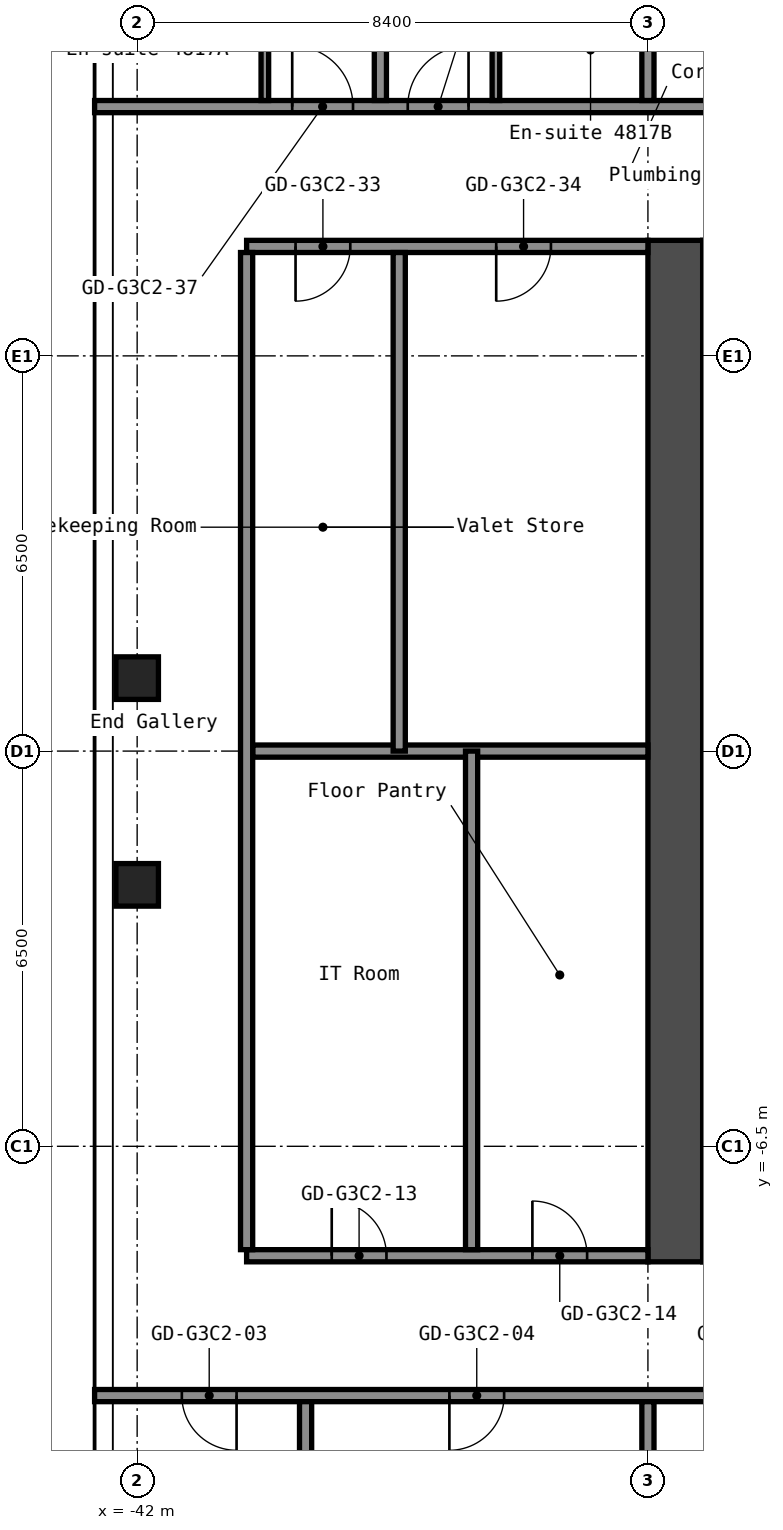
"""IFC4 building model, lengths in metres.
Left out: names, types, materials, properties, quantities, classifications, styles, units other than length and angle.
Written with IfcOpenShell. Run it as: python <this file> out.ifc"""

import sys

from ifc_helpers import new_model, si_unit, direction, frame, frame_2d, origin, origin_2d, place, context, subcontext, project, spatial, rectangle, hollow_rectangle, extrude, element, fill, save


model = new_model("IFC4")
c1 = context("Model", 3, precision=1e-05, world=origin(), true_north=direction((0.0, 1.0)))
c2 = subcontext(c1, "Body", "Model", "MODEL_VIEW")
j1 = project(units=[si_unit("LENGTHUNIT", "METRE"), si_unit("PLANEANGLEUNIT", "RADIAN")], contexts=[c1])
p1 = place(None, origin())
s1 = spatial("IfcSite", under=j1, at=p1, CompositionType="ELEMENT")
p2 = place(p1, origin())
s2 = spatial("IfcBuilding", under=s1, at=p2, CompositionType="ELEMENT")
p3 = place(p2, frame((0.0, 0.0, 169.4)))
s3 = spatial("IfcBuildingStorey", under=s2, at=p3, CompositionType="ELEMENT", Elevation=169.4)
for number, where, z_axis, x_axis in (
    (1, (-42.0, -2.2, 0.0), (0.0, 0.0, 1.0), (1.0, 0.0, 0.0)),
    (2, (-42.0, 1.2, 0.0), (0.0, 0.0, 1.0), (1.0, 0.0, 0.0)),
):
    element("IfcColumn", number, at=place(p3, frame(where, z_axis=z_axis, x_axis=x_axis)), inside=s3, PredefinedType="COLUMN", context=c2, shape_type="SweptSolid", body=[
        extrude(hollow_rectangle(XDim=0.7, YDim=0.7, WallThickness=0.028, at=origin_2d()), origin(), (0.0, 0.0, 1.0), 2.75),
    ])
p4 = place(p3, frame((-33.15, -8.4, 0.0), z_axis=(0.0, 0.0, 1.0), x_axis=(0.0, 1.0, 0.0)))
e3 = element("IfcWall", 3, at=p4, inside=s3, PredefinedType="SHEAR", context=c2, shape_type="SweptSolid", body=[
    extrude(rectangle(XDim=16.8, YDim=0.9, at=frame_2d((8.4, 0.0))), origin(), (0.0, 0.0, 1.0), 2.75),
])
p5 = place(p3, frame((-42.7, -10.6, 0.0), z_axis=(0.0, 0.0, 1.0), x_axis=(1.0, 0.0, 0.0)))
e4 = element("IfcWall", 4, at=p5, inside=s3, PredefinedType="PARTITIONING", context=c2, shape_type="SweptSolid", body=[
    extrude(rectangle(XDim=25.9, YDim=0.2, at=frame_2d((12.95, 0.0))), origin(), (0.0, 0.0, 1.0), 2.75),
])
p6 = place(p5, frame((1.435, 0.0, 0.0)))
e5 = element("IfcOpeningElement", 5, at=p6, cuts=e4, PredefinedType="OPENING", context=c2, shape_type="SweptSolid", body=[
    extrude(rectangle(XDim=0.9, YDim=2.1, at=frame_2d((0.45, 1.05))), frame((0.0, 0.11, 0.0), z_axis=(0.0, -1.0, 0.0), x_axis=(1.0, 0.0, 0.0)), (0.0, 0.0, 1.0), 0.22),
])
p7 = place(p5, frame((5.835, 0.0, 0.0)))
e6 = element("IfcOpeningElement", 6, at=p7, cuts=e4, PredefinedType="OPENING", context=c2, shape_type="SweptSolid", body=[
    extrude(rectangle(XDim=0.9, YDim=2.1, at=frame_2d((0.45, 1.05))), frame((0.0, 0.11, 0.0), z_axis=(0.0, -1.0, 0.0), x_axis=(1.0, 0.0, 0.0)), (0.0, 0.0, 1.0), 0.22),
])
p8 = place(p5, frame((10.415, 0.0, 0.0)))
e7 = element("IfcOpeningElement", 7, at=p8, cuts=e4, PredefinedType="OPENING", context=c2, shape_type="SweptSolid", body=[
    extrude(rectangle(XDim=0.9, YDim=2.1, at=frame_2d((0.45, 1.05))), frame((0.0, 0.11, 0.0), z_axis=(0.0, -1.0, 0.0), x_axis=(1.0, 0.0, 0.0)), (0.0, 0.0, 1.0), 0.22),
])
p9 = place(p5, frame((14.615, 0.0, 0.0)))
e8 = element("IfcOpeningElement", 8, at=p9, cuts=e4, PredefinedType="OPENING", context=c2, shape_type="SweptSolid", body=[
    extrude(rectangle(XDim=0.9, YDim=2.1, at=frame_2d((0.45, 1.05))), frame((0.0, 0.11, 0.0), z_axis=(0.0, -1.0, 0.0), x_axis=(1.0, 0.0, 0.0)), (0.0, 0.0, 1.0), 0.22),
])
p10 = place(p5, frame((19.32, 0.0, 0.0)))
e9 = element("IfcOpeningElement", 9, at=p10, cuts=e4, PredefinedType="OPENING", context=c2, shape_type="SweptSolid", body=[
    extrude(rectangle(XDim=0.9, YDim=2.1, at=frame_2d((0.45, 1.05))), frame((0.0, 0.11, 0.0), z_axis=(0.0, -1.0, 0.0), x_axis=(1.0, 0.0, 0.0)), (0.0, 0.0, 1.0), 0.22),
])
p11 = place(p5, frame((23.52, 0.0, 0.0)))
e10 = element("IfcOpeningElement", 10, at=p11, cuts=e4, PredefinedType="OPENING", context=c2, shape_type="SweptSolid", body=[
    extrude(rectangle(XDim=0.9, YDim=2.1, at=frame_2d((0.45, 1.05))), frame((0.0, 0.11, 0.0), z_axis=(0.0, -1.0, 0.0), x_axis=(1.0, 0.0, 0.0)), (0.0, 0.0, 1.0), 0.22),
])
p12 = place(p3, frame((-40.2, -8.3, 0.0), z_axis=(0.0, 0.0, 1.0), x_axis=(1.0, 0.0, 0.0)))
e11 = element("IfcWall", 11, at=p12, inside=s3, PredefinedType="PARTITIONING", context=c2, shape_type="SweptSolid", body=[
    extrude(rectangle(XDim=6.6, YDim=0.2, at=frame_2d((3.3, 0.0))), origin(), (0.0, 0.0, 1.0), 2.75),
])
p13 = place(p12, frame((1.4, 0.0, 0.0)))
e12 = element("IfcOpeningElement", 12, at=p13, cuts=e11, PredefinedType="OPENING", context=c2, shape_type="SweptSolid", body=[
    extrude(rectangle(XDim=0.9, YDim=2.1, at=frame_2d((0.45, 1.05))), frame((0.0, 0.11, 0.0), z_axis=(0.0, -1.0, 0.0), x_axis=(1.0, 0.0, 0.0)), (0.0, 0.0, 1.0), 0.22),
])
p14 = place(p12, frame((4.7, 0.0, 0.0)))
e13 = element("IfcOpeningElement", 13, at=p14, cuts=e11, PredefinedType="OPENING", context=c2, shape_type="SweptSolid", body=[
    extrude(rectangle(XDim=0.9, YDim=2.1, at=frame_2d((0.45, 1.05))), frame((0.0, 0.11, 0.0), z_axis=(0.0, -1.0, 0.0), x_axis=(1.0, 0.0, 0.0)), (0.0, 0.0, 1.0), 0.22),
])
p15 = place(p3, frame((-40.1, 0.0, 0.0), z_axis=(0.0, 0.0, 1.0), x_axis=(1.0, 0.0, 0.0)))
e14 = element("IfcWall", 14, at=p15, inside=s3, PredefinedType="PARTITIONING", context=c2, shape_type="SweptSolid", body=[
    extrude(rectangle(XDim=6.5, YDim=0.2, at=frame_2d((3.25, 0.0))), origin(), (0.0, 0.0, 1.0), 2.75),
])
p16 = place(p3, frame((-40.2, 8.3, 0.0), z_axis=(0.0, 0.0, 1.0), x_axis=(1.0, 0.0, 0.0)))
e15 = element("IfcWall", 15, at=p16, inside=s3, PredefinedType="PARTITIONING", context=c2, shape_type="SweptSolid", body=[
    extrude(rectangle(XDim=6.6, YDim=0.2, at=frame_2d((3.3, 0.0))), origin(), (0.0, 0.0, 1.0), 2.75),
])
p17 = place(p16, frame((0.805, 0.0, 0.0)))
e16 = element("IfcOpeningElement", 16, at=p17, cuts=e15, PredefinedType="OPENING", context=c2, shape_type="SweptSolid", body=[
    extrude(rectangle(XDim=0.9, YDim=2.1, at=frame_2d((0.45, 1.05))), frame((0.0, 0.11, 0.0), z_axis=(0.0, -1.0, 0.0), x_axis=(1.0, 0.0, 0.0)), (0.0, 0.0, 1.0), 0.22),
])
p18 = place(p16, frame((4.105, 0.0, 0.0)))
e17 = element("IfcOpeningElement", 17, at=p18, cuts=e15, PredefinedType="OPENING", context=c2, shape_type="SweptSolid", body=[
    extrude(rectangle(XDim=0.9, YDim=2.1, at=frame_2d((0.45, 1.05))), frame((0.0, 0.11, 0.0), z_axis=(0.0, -1.0, 0.0), x_axis=(1.0, 0.0, 0.0)), (0.0, 0.0, 1.0), 0.22),
])
p19 = place(p3, frame((-42.7, 10.6, 0.0), z_axis=(0.0, 0.0, 1.0), x_axis=(1.0, 0.0, 0.0)))
e18 = element("IfcWall", 18, at=p19, inside=s3, PredefinedType="PARTITIONING", context=c2, shape_type="SweptSolid", body=[
    extrude(rectangle(XDim=25.9, YDim=0.2, at=frame_2d((12.95, 0.0))), origin(), (0.0, 0.0, 1.0), 2.75),
])
p20 = place(p19, frame((3.25, 0.0, 0.0)))
e19 = element("IfcOpeningElement", 19, at=p20, cuts=e18, PredefinedType="OPENING", context=c2, shape_type="SweptSolid", body=[
    extrude(rectangle(XDim=1.0, YDim=2.1, at=frame_2d((0.5, 1.05))), frame((0.0, 0.11, 0.0), z_axis=(0.0, -1.0, 0.0), x_axis=(1.0, 0.0, 0.0)), (0.0, 0.0, 1.0), 0.22),
])
p21 = place(p19, frame((5.15, 0.0, 0.0)))
e20 = element("IfcOpeningElement", 20, at=p21, cuts=e18, PredefinedType="OPENING", context=c2, shape_type="SweptSolid", body=[
    extrude(rectangle(XDim=1.0, YDim=2.1, at=frame_2d((0.5, 1.05))), frame((0.0, 0.11, 0.0), z_axis=(0.0, -1.0, 0.0), x_axis=(1.0, 0.0, 0.0)), (0.0, 0.0, 1.0), 0.22),
])
p22 = place(p19, frame((14.5, 0.0, 0.0)))
e21 = element("IfcOpeningElement", 21, at=p22, cuts=e18, PredefinedType="OPENING", context=c2, shape_type="SweptSolid", body=[
    extrude(rectangle(XDim=1.0, YDim=2.1, at=frame_2d((0.5, 1.05))), frame((0.0, 0.11, 0.0), z_axis=(0.0, -1.0, 0.0), x_axis=(1.0, 0.0, 0.0)), (0.0, 0.0, 1.0), 0.22),
])
p23 = place(p19, frame((20.35, 0.0, 0.0)))
e22 = element("IfcOpeningElement", 22, at=p23, cuts=e18, PredefinedType="OPENING", context=c2, shape_type="SweptSolid", body=[
    extrude(rectangle(XDim=1.0, YDim=2.1, at=frame_2d((0.5, 1.05))), frame((0.0, 0.11, 0.0), z_axis=(0.0, -1.0, 0.0), x_axis=(1.0, 0.0, 0.0)), (0.0, 0.0, 1.0), 0.22),
])
p24 = place(p19, frame((22.05, 0.0, 0.0)))
e23 = element("IfcOpeningElement", 23, at=p24, cuts=e18, PredefinedType="OPENING", context=c2, shape_type="SweptSolid", body=[
    extrude(rectangle(XDim=1.0, YDim=2.1, at=frame_2d((0.5, 1.05))), frame((0.0, 0.11, 0.0), z_axis=(0.0, -1.0, 0.0), x_axis=(1.0, 0.0, 0.0)), (0.0, 0.0, 1.0), 0.22),
])
p25 = place(p3, frame((-40.2, -8.2, 0.0), z_axis=(0.0, 0.0, 1.0), x_axis=(0.0, 1.0, 0.0)))
e24 = element("IfcWall", 24, at=p25, inside=s3, PredefinedType="PARTITIONING", context=c2, shape_type="SweptSolid", body=[
    extrude(rectangle(XDim=16.4, YDim=0.2, at=frame_2d((8.2, 0.0))), origin(), (0.0, 0.0, 1.0), 2.75),
])
p26 = place(p3, frame((-39.9, 10.7, 0.0), z_axis=(0.0, 0.0, 1.0), x_axis=(0.0, 1.0, 0.0)))
e25 = element("IfcWall", 25, at=p26, inside=s3, PredefinedType="PARTITIONING", context=c2, shape_type="SweptSolid", body=[
    extrude(rectangle(XDim=2.9, YDim=0.125, at=frame_2d((1.45, 0.0))), origin(), (0.0, 0.0, 1.0), 2.75),
])
p27 = place(p26, frame((1.5, 0.0, 0.0)))
e26 = element("IfcOpeningElement", 26, at=p27, cuts=e25, PredefinedType="OPENING", context=c2, shape_type="SweptSolid", body=[
    extrude(rectangle(XDim=0.8, YDim=2.1, at=frame_2d((0.4, 1.05))), frame((0.0, 0.073, 0.0), z_axis=(0.0, -1.0, 0.0), x_axis=(1.0, 0.0, 0.0)), (0.0, 0.0, 1.0), 0.145),
])
p28 = place(p3, frame((-39.23, -19.3, 0.0), z_axis=(0.0, 0.0, 1.0), x_axis=(0.0, 1.0, 0.0)))
e27 = element("IfcWall", 27, at=p28, inside=s3, PredefinedType="PARTITIONING", context=c2, shape_type="SweptSolid", body=[
    extrude(rectangle(XDim=8.6, YDim=0.2, at=frame_2d((4.3, 0.0))), origin(), (0.0, 0.0, 1.0), 2.75),
])
p29 = place(p3, frame((-38.0, 10.7, 0.0), z_axis=(0.0, 0.0, 1.0), x_axis=(0.0, 1.0, 0.0)))
e28 = element("IfcWall", 28, at=p29, inside=s3, PredefinedType="PARTITIONING", context=c2, shape_type="SweptSolid", body=[
    extrude(rectangle(XDim=7.6, YDim=0.2, at=frame_2d((3.8, 0.0))), origin(), (0.0, 0.0, 1.0), 2.75),
])
for number, where, z_axis, x_axis in (
    (29, (-37.69, 0.0, 0.0), (0.0, 0.0, 1.0), (0.0, 1.0, 0.0)),
    (30, (-36.5, -8.2, 0.0), (0.0, 0.0, 1.0), (0.0, 1.0, 0.0)),
):
    element("IfcWall", number, at=place(p3, frame(where, z_axis=z_axis, x_axis=x_axis)), inside=s3, PredefinedType="PARTITIONING", context=c2, shape_type="SweptSolid", body=[
        extrude(rectangle(XDim=8.2, YDim=0.2, at=frame_2d((4.1, 0.0))), origin(), (0.0, 0.0, 1.0), 2.75),
    ])
p30 = place(p3, frame((-36.1, 10.7, 0.0), z_axis=(0.0, 0.0, 1.0), x_axis=(0.0, 1.0, 0.0)))
e31 = element("IfcWall", 31, at=p30, inside=s3, PredefinedType="PARTITIONING", context=c2, shape_type="SweptSolid", body=[
    extrude(rectangle(XDim=2.9, YDim=0.125, at=frame_2d((1.45, 0.0))), origin(), (0.0, 0.0, 1.0), 2.75),
])
p31 = place(p30, frame((1.5, 0.0, 0.0)))
e32 = element("IfcOpeningElement", 32, at=p31, cuts=e31, PredefinedType="OPENING", context=c2, shape_type="SweptSolid", body=[
    extrude(rectangle(XDim=0.8, YDim=2.1, at=frame_2d((0.4, 1.05))), frame((0.0, 0.073, 0.0), z_axis=(0.0, -1.0, 0.0), x_axis=(1.0, 0.0, 0.0)), (0.0, 0.0, 1.0), 0.145),
])
p32 = place(p3, frame((-33.6, -19.3, 0.0), z_axis=(0.0, 0.0, 1.0), x_axis=(0.0, 1.0, 0.0)))
e33 = element("IfcWall", 33, at=p32, inside=s3, PredefinedType="PARTITIONING", context=c2, shape_type="SweptSolid", body=[
    extrude(rectangle(XDim=8.6, YDim=0.2, at=frame_2d((4.3, 0.0))), origin(), (0.0, 0.0, 1.0), 2.75),
])
p33 = place(p3, frame((-33.6, 10.7, 0.0), z_axis=(0.0, 0.0, 1.0), x_axis=(0.0, 1.0, 0.0)))
e34 = element("IfcWall", 34, at=p33, inside=s3, PredefinedType="PARTITIONING", context=c2, shape_type="SweptSolid", body=[
    extrude(rectangle(XDim=7.6, YDim=0.2, at=frame_2d((3.8, 0.0))), origin(), (0.0, 0.0, 1.0), 2.75),
])
p34 = place(p6, origin())
e35 = element("IfcDoor", 35, at=p34, inside=s3, OperationType="SINGLE_SWING_RIGHT", PredefinedType="DOOR", context=c2, shape_type="SweptSolid", body=[
    extrude(rectangle(XDim=0.9, YDim=2.1, at=frame_2d((0.45, 1.05))), frame((0.0, 0.025, 0.0), z_axis=(0.0, -1.0, 0.0), x_axis=(1.0, 0.0, 0.0)), (0.0, 0.0, 1.0), 0.05),
])
fill(e5, e35)
p35 = place(p7, origin())
e36 = element("IfcDoor", 36, at=p35, inside=s3, OperationType="SINGLE_SWING_LEFT", PredefinedType="DOOR", context=c2, shape_type="SweptSolid", body=[
    extrude(rectangle(XDim=0.9, YDim=2.1, at=frame_2d((0.45, 1.05))), frame((0.0, 0.025, 0.0), z_axis=(0.0, -1.0, 0.0), x_axis=(1.0, 0.0, 0.0)), (0.0, 0.0, 1.0), 0.05),
])
fill(e6, e36)
p36 = place(p13, origin())
e37 = element("IfcDoor", 37, at=p36, inside=s3, OperationType="SINGLE_SWING_RIGHT", PredefinedType="DOOR", context=c2, shape_type="SweptSolid", body=[
    extrude(rectangle(XDim=0.9, YDim=2.1, at=frame_2d((0.45, 1.05))), frame((0.0, 0.025, 0.0), z_axis=(0.0, -1.0, 0.0), x_axis=(1.0, 0.0, 0.0)), (0.0, 0.0, 1.0), 0.05),
])
fill(e12, e37)
p37 = place(p14, origin())
e38 = element("IfcDoor", 38, at=p37, inside=s3, OperationType="SINGLE_SWING_RIGHT", PredefinedType="DOOR", context=c2, shape_type="SweptSolid", body=[
    extrude(rectangle(XDim=0.9, YDim=2.1, at=frame_2d((0.45, 1.05))), frame((0.0, 0.025, 0.0), z_axis=(0.0, -1.0, 0.0), x_axis=(1.0, 0.0, 0.0)), (0.0, 0.0, 1.0), 0.05),
])
fill(e13, e38)
p38 = place(p17, origin())
e39 = element("IfcDoor", 39, at=p38, inside=s3, OperationType="SINGLE_SWING_LEFT", PredefinedType="DOOR", context=c2, shape_type="SweptSolid", body=[
    extrude(rectangle(XDim=0.9, YDim=2.1, at=frame_2d((0.45, 1.05))), frame((0.0, 0.025, 0.0), z_axis=(0.0, -1.0, 0.0), x_axis=(1.0, 0.0, 0.0)), (0.0, 0.0, 1.0), 0.05),
])
fill(e16, e39)
p39 = place(p18, origin())
e40 = element("IfcDoor", 40, at=p39, inside=s3, OperationType="SINGLE_SWING_LEFT", PredefinedType="DOOR", context=c2, shape_type="SweptSolid", body=[
    extrude(rectangle(XDim=0.9, YDim=2.1, at=frame_2d((0.45, 1.05))), frame((0.0, 0.025, 0.0), z_axis=(0.0, -1.0, 0.0), x_axis=(1.0, 0.0, 0.0)), (0.0, 0.0, 1.0), 0.05),
])
fill(e17, e40)
p40 = place(p20, origin())
e41 = element("IfcDoor", 41, at=p40, inside=s3, OperationType="SINGLE_SWING_RIGHT", PredefinedType="DOOR", context=c2, shape_type="SweptSolid", body=[
    extrude(rectangle(XDim=1.0, YDim=2.1, at=frame_2d((0.5, 1.05))), frame((0.0, 0.025, 0.0), z_axis=(0.0, -1.0, 0.0), x_axis=(1.0, 0.0, 0.0)), (0.0, 0.0, 1.0), 0.05),
])
fill(e19, e41)
p41 = place(p21, origin())
e42 = element("IfcDoor", 42, at=p41, inside=s3, OperationType="SINGLE_SWING_LEFT", PredefinedType="DOOR", context=c2, shape_type="SweptSolid", body=[
    extrude(rectangle(XDim=1.0, YDim=2.1, at=frame_2d((0.5, 1.05))), frame((0.0, 0.025, 0.0), z_axis=(0.0, -1.0, 0.0), x_axis=(1.0, 0.0, 0.0)), (0.0, 0.0, 1.0), 0.05),
])
fill(e20, e42)
save(model, sys.argv[1])
